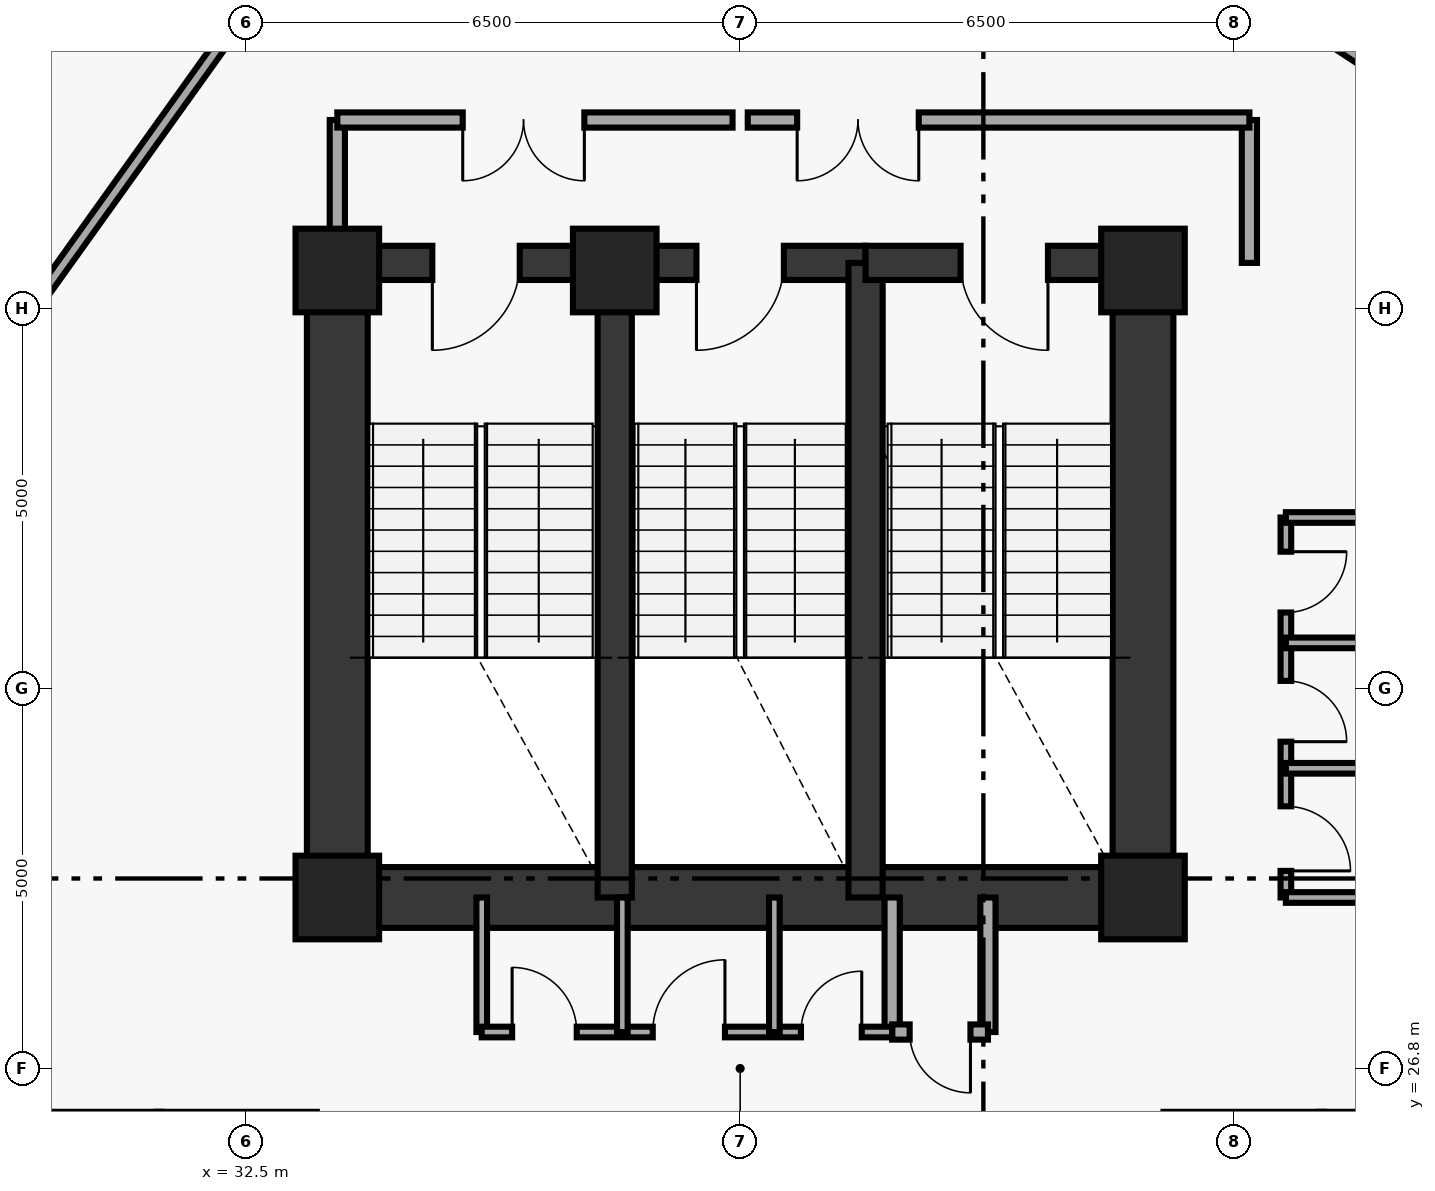
"""IFC4 building model, lengths in metres.
Left out: names, types, materials, properties, quantities, classifications, styles, units other than length and angle.
Written with IfcOpenShell. Run it as: python <this file> out.ifc"""

import sys

from ifc_helpers import new_model, si_unit, direction, frame, frame_2d, origin, origin_2d, place, context, subcontext, project, spatial, rectangle, extrude, element, fill, save


model = new_model("IFC4")
c1 = context("Model", 3, precision=1e-05, world=origin(), true_north=direction((0.0, 1.0)))
c2 = subcontext(c1, "Body", "Model", "MODEL_VIEW")
j1 = project(units=[si_unit("LENGTHUNIT", "METRE"), si_unit("PLANEANGLEUNIT", "RADIAN")], contexts=[c1])
p1 = place(None, origin())
s1 = spatial("IfcSite", under=j1, at=p1, CompositionType="ELEMENT")
p2 = place(p1, origin())
s2 = spatial("IfcBuilding", under=s1, at=p2, CompositionType="ELEMENT")
p3 = place(p2, frame((0.0, 0.0, 21.0)))
s3 = spatial("IfcBuildingStorey", under=s2, at=p3, CompositionType="ELEMENT", Elevation=21.0)
for number, where, z_axis, x_axis in (
    (1, (44.3, 29.05, 0.0), (0.0, 0.0, 1.0), (1.0, 0.0, 0.0)),
    (2, (44.3, 37.3, 0.0), (0.0, 0.0, 1.0), (1.0, 0.0, 0.0)),
    (3, (37.35, 37.3, 0.0), (0.0, 0.0, 1.0), (1.0, 0.0, 0.0)),
    (4, (33.7, 37.3, 0.0), (0.0, 0.0, 1.0), (1.0, 0.0, 0.0)),
    (5, (33.7, 29.05, 0.0), (0.0, 0.0, 1.0), (1.0, 0.0, 0.0)),
):
    element("IfcColumn", number, at=place(p3, frame(where, z_axis=z_axis, x_axis=x_axis)), inside=s3, PredefinedType="PILASTER", context=c2, shape_type="SweptSolid", body=[
        extrude(rectangle(XDim=1.1, YDim=1.1, at=origin_2d()), origin(), (0.0, 0.0, 1.0), 3.79),
    ])
for number, where, z_axis, x_axis in (
    (6, (33.7, 29.05, 0.0), (0.0, 0.0, 1.0), (0.0, 1.0, 0.0)),
    (7, (44.3, 29.05, 0.0), (0.0, 0.0, 1.0), (0.0, 1.0, 0.0)),
):
    element("IfcWall", number, at=place(p3, frame(where, z_axis=z_axis, x_axis=x_axis)), inside=s3, PredefinedType="SHEAR", context=c2, shape_type="SweptSolid", body=[
        extrude(rectangle(XDim=8.35, YDim=0.8, at=frame_2d((4.175, 0.0))), origin(), (0.0, 0.0, 1.0), 3.79),
    ])
p4 = place(p3, frame((33.7, 29.05, 0.0), z_axis=(0.0, 0.0, 1.0), x_axis=(1.0, 0.0, 0.0)))
e8 = element("IfcWall", 8, at=p4, inside=s3, PredefinedType="SHEAR", context=c2, shape_type="SweptSolid", body=[
    extrude(rectangle(XDim=10.6, YDim=0.8, at=frame_2d((5.3, 0.0))), origin(), (0.0, 0.0, 1.0), 3.79),
])
p5 = place(p3, frame((37.35, 37.4, 0.0), z_axis=(0.0, 0.0, 1.0), x_axis=(-1.0, 0.0, 0.0)))
e9 = element("IfcWall", 9, at=p5, inside=s3, PredefinedType="SHEAR", context=c2, shape_type="SweptSolid", body=[
    extrude(rectangle(XDim=3.65, YDim=0.45, at=frame_2d((1.825, 0.0))), origin(), (0.0, 0.0, 1.0), 3.79),
])
p6 = place(p5, frame((1.25, 0.0, 0.0)))
e10 = element("IfcOpeningElement", 10, at=p6, cuts=e9, PredefinedType="OPENING", context=c2, shape_type="SweptSolid", body=[
    extrude(rectangle(XDim=1.15, YDim=2.15, at=frame_2d((0.575, 1.075))), frame((0.0, 0.235, 0.0), z_axis=(0.0, -1.0, 0.0), x_axis=(1.0, 0.0, 0.0)), (0.0, 0.0, 1.0), 0.47),
])
p7 = place(p3, frame((37.35, 29.05, 0.0), z_axis=(0.0, 0.0, 1.0), x_axis=(0.0, 1.0, 0.0)))
e11 = element("IfcWall", 11, at=p7, inside=s3, PredefinedType="SHEAR", context=c2, shape_type="SweptSolid", body=[
    extrude(rectangle(XDim=8.35, YDim=0.45, at=frame_2d((4.175, 0.0))), origin(), (0.0, 0.0, 1.0), 3.79),
])
p8 = place(p3, frame((40.65, 37.4, 0.0), z_axis=(0.0, 0.0, 1.0), x_axis=(-1.0, 0.0, 0.0)))
e12 = element("IfcWall", 12, at=p8, inside=s3, PredefinedType="SHEAR", context=c2, shape_type="SweptSolid", body=[
    extrude(rectangle(XDim=3.3, YDim=0.45, at=frame_2d((1.65, 0.0))), origin(), (0.0, 0.0, 1.0), 3.79),
])
p9 = place(p8, frame((1.075, 0.0, 0.0)))
e13 = element("IfcOpeningElement", 13, at=p9, cuts=e12, PredefinedType="OPENING", context=c2, shape_type="SweptSolid", body=[
    extrude(rectangle(XDim=1.15, YDim=2.15, at=frame_2d((0.575, 1.075))), frame((0.0, 0.235, 0.0), z_axis=(0.0, -1.0, 0.0), x_axis=(1.0, 0.0, 0.0)), (0.0, 0.0, 1.0), 0.47),
])
p10 = place(p3, frame((40.65, 29.05, 0.0), z_axis=(0.0, 0.0, 1.0), x_axis=(0.0, 1.0, 0.0)))
e14 = element("IfcWall", 14, at=p10, inside=s3, PredefinedType="SHEAR", context=c2, shape_type="SweptSolid", body=[
    extrude(rectangle(XDim=8.35, YDim=0.45, at=frame_2d((4.175, 0.0))), origin(), (0.0, 0.0, 1.0), 3.79),
])
p11 = place(p3, frame((44.3, 37.4, 0.0), z_axis=(0.0, 0.0, 1.0), x_axis=(-1.0, 0.0, 0.0)))
e15 = element("IfcWall", 15, at=p11, inside=s3, PredefinedType="SHEAR", context=c2, shape_type="SweptSolid", body=[
    extrude(rectangle(XDim=3.65, YDim=0.45, at=frame_2d((1.825, 0.0))), origin(), (0.0, 0.0, 1.0), 3.79),
])
p12 = place(p11, frame((1.25, 0.0, 0.0)))
e16 = element("IfcOpeningElement", 16, at=p12, cuts=e15, PredefinedType="OPENING", context=c2, shape_type="SweptSolid", body=[
    extrude(rectangle(XDim=1.15, YDim=2.15, at=frame_2d((0.575, 1.075))), frame((0.0, 0.235, 0.0), z_axis=(0.0, -1.0, 0.0), x_axis=(1.0, 0.0, 0.0)), (0.0, 0.0, 1.0), 0.47),
])
for number, where, z_axis, x_axis in (
    (17, (33.7, 37.4, 0.0), (0.0, 0.0, 1.0), (0.0, 1.0, 0.0)),
    (18, (45.7, 37.4, 0.0), (0.0, 0.0, 1.0), (0.0, 1.0, 0.0)),
):
    element("IfcWall", number, at=place(p3, frame(where, z_axis=z_axis, x_axis=x_axis)), inside=s3, PredefinedType="SOLIDWALL", context=c2, shape_type="SweptSolid", body=[
        extrude(rectangle(XDim=1.88, YDim=0.2, at=frame_2d((0.94, 0.0))), origin(), (0.0, 0.0, 1.0), 3.79),
    ])
p13 = place(p3, frame((38.9, 39.28, 0.0), z_axis=(0.0, 0.0, 1.0), x_axis=(-1.0, 0.0, 0.0)))
e19 = element("IfcWall", 19, at=p13, inside=s3, PredefinedType="SOLIDWALL", context=c2, shape_type="SweptSolid", body=[
    extrude(rectangle(XDim=5.2, YDim=0.2, at=frame_2d((2.6, 0.0))), origin(), (0.0, 0.0, 1.0), 3.79),
])
p14 = place(p13, frame((1.95, 0.0, 0.0)))
e20 = element("IfcOpeningElement", 20, at=p14, cuts=e19, PredefinedType="OPENING", context=c2, shape_type="SweptSolid", body=[
    extrude(rectangle(XDim=1.6, YDim=2.2, at=frame_2d((0.8, 1.1))), frame((0.0, 0.11, 0.0), z_axis=(0.0, -1.0, 0.0), x_axis=(1.0, 0.0, 0.0)), (0.0, 0.0, 1.0), 0.22),
])
p15 = place(p3, frame((45.7, 39.28, 0.0), z_axis=(0.0, 0.0, 1.0), x_axis=(-1.0, 0.0, 0.0)))
e21 = element("IfcWall", 21, at=p15, inside=s3, PredefinedType="SOLIDWALL", context=c2, shape_type="SweptSolid", body=[
    extrude(rectangle(XDim=6.6, YDim=0.2, at=frame_2d((3.3, 0.0))), origin(), (0.0, 0.0, 1.0), 3.79),
])
p16 = place(p15, frame((4.35, 0.0, 0.0)))
e22 = element("IfcOpeningElement", 22, at=p16, cuts=e21, PredefinedType="OPENING", context=c2, shape_type="SweptSolid", body=[
    extrude(rectangle(XDim=1.6, YDim=2.2, at=frame_2d((0.8, 1.1))), frame((0.0, 0.11, 0.0), z_axis=(0.0, -1.0, 0.0), x_axis=(1.0, 0.0, 0.0)), (0.0, 0.0, 1.0), 0.22),
])
p17 = place(p3, frame((35.6, 27.28, 0.0), z_axis=(0.0, 0.0, 1.0), x_axis=(0.0, 1.0, 0.0)))
e23 = element("IfcWall", 23, at=p17, inside=s3, PredefinedType="PARTITIONING", context=c2, shape_type="SweptSolid", body=[
    extrude(rectangle(XDim=1.77, YDim=0.14, at=frame_2d((0.885, 0.0))), origin(), (0.0, 0.0, 1.0), 3.79),
])
for number, where, z_axis, x_axis in (
    (24, (41.0, 27.28, 0.0), (0.0, 0.0, 1.0), (0.0, 1.0, 0.0)),
    (25, (42.26, 27.28, 0.0), (0.0, 0.0, 1.0), (0.0, 1.0, 0.0)),
):
    element("IfcWall", number, at=place(p3, frame(where, z_axis=z_axis, x_axis=x_axis)), inside=s3, PredefinedType="SOLIDWALL", context=c2, shape_type="SweptSolid", body=[
        extrude(rectangle(XDim=1.77, YDim=0.2, at=frame_2d((0.885, 0.0))), origin(), (0.0, 0.0, 1.0), 3.79),
    ])
p18 = place(p3, frame((41.0, 27.28, 0.0), z_axis=(0.0, 0.0, 1.0), x_axis=(1.0, 0.0, 0.0)))
e26 = element("IfcWall", 26, at=p18, inside=s3, PredefinedType="SOLIDWALL", context=c2, shape_type="SweptSolid", body=[
    extrude(rectangle(XDim=1.26, YDim=0.2, at=frame_2d((0.63, 0.0))), origin(), (0.0, 0.0, 1.0), 3.79),
])
p19 = place(p18, frame((0.23, 0.0, 0.0)))
e27 = element("IfcOpeningElement", 27, at=p19, cuts=e26, PredefinedType="OPENING", context=c2, shape_type="SweptSolid", body=[
    extrude(rectangle(XDim=0.8, YDim=2.05, at=frame_2d((0.4, 1.025))), frame((0.0, 0.11, 0.0), z_axis=(0.0, -1.0, 0.0), x_axis=(1.0, 0.0, 0.0)), (0.0, 0.0, 1.0), 0.22),
])
p20 = place(p3, frame((35.6, 27.28, 0.0), z_axis=(0.0, 0.0, 1.0), x_axis=(1.0, 0.0, 0.0)))
e28 = element("IfcWall", 28, at=p20, inside=s3, PredefinedType="PARTITIONING", context=c2, shape_type="SweptSolid", body=[
    extrude(rectangle(XDim=5.4, YDim=0.14, at=frame_2d((2.7, 0.0))), origin(), (0.0, 0.0, 1.0), 3.79),
])
p21 = place(p20, frame((0.4, 0.0, 0.0)))
e29 = element("IfcOpeningElement", 29, at=p21, cuts=e28, PredefinedType="OPENING", context=c2, shape_type="SweptSolid", body=[
    extrude(rectangle(XDim=0.85, YDim=2.1, at=frame_2d((0.425, 1.05))), frame((0.0, 0.08, 0.0), z_axis=(0.0, -1.0, 0.0), x_axis=(1.0, 0.0, 0.0)), (0.0, 0.0, 1.0), 0.16),
])
p22 = place(p20, frame((2.25, 0.0, 0.0)))
e30 = element("IfcOpeningElement", 30, at=p22, cuts=e28, PredefinedType="OPENING", context=c2, shape_type="SweptSolid", body=[
    extrude(rectangle(XDim=0.95, YDim=2.1, at=frame_2d((0.475, 1.05))), frame((0.0, 0.08, 0.0), z_axis=(0.0, -1.0, 0.0), x_axis=(1.0, 0.0, 0.0)), (0.0, 0.0, 1.0), 0.16),
])
p23 = place(p20, frame((4.2, 0.0, 0.0)))
e31 = element("IfcOpeningElement", 31, at=p23, cuts=e28, PredefinedType="OPENING", context=c2, shape_type="SweptSolid", body=[
    extrude(rectangle(XDim=0.8, YDim=2.05, at=frame_2d((0.4, 1.025))), frame((0.0, 0.08, 0.0), z_axis=(0.0, -1.0, 0.0), x_axis=(1.0, 0.0, 0.0)), (0.0, 0.0, 1.0), 0.16),
])
for number, where, z_axis, x_axis in (
    (32, (37.45, 27.28, 0.0), (0.0, 0.0, 1.0), (0.0, 1.0, 0.0)),
    (33, (39.45, 27.28, 0.0), (0.0, 0.0, 1.0), (0.0, 1.0, 0.0)),
):
    element("IfcWall", number, at=place(p3, frame(where, z_axis=z_axis, x_axis=x_axis)), inside=s3, PredefinedType="PARTITIONING", context=c2, shape_type="SweptSolid", body=[
        extrude(rectangle(XDim=1.77, YDim=0.14, at=frame_2d((0.885, 0.0))), origin(), (0.0, 0.0, 1.0), 3.79),
    ])
p24 = place(p3, frame((46.18, 34.05, 0.0), z_axis=(0.0, 0.0, 1.0), x_axis=(0.0, -1.0, 0.0)))
e34 = element("IfcWall", 34, at=p24, inside=s3, PredefinedType="PARTITIONING", context=c2, shape_type="SweptSolid", body=[
    extrude(rectangle(XDim=5.0, YDim=0.14, at=frame_2d((2.5, 0.0))), origin(), (0.0, 0.0, 1.0), 3.79),
])
p25 = place(p24, frame((3.8, 0.0, 0.0)))
e35 = element("IfcOpeningElement", 35, at=p25, cuts=e34, PredefinedType="OPENING", context=c2, shape_type="SweptSolid", body=[
    extrude(rectangle(XDim=0.85, YDim=2.1, at=frame_2d((0.425, 1.05))), frame((0.0, 0.08, 0.0), z_axis=(0.0, -1.0, 0.0), x_axis=(1.0, 0.0, 0.0)), (0.0, 0.0, 1.0), 0.16),
])
p26 = place(p24, frame((2.15, 0.0, 0.0)))
e36 = element("IfcOpeningElement", 36, at=p26, cuts=e34, PredefinedType="OPENING", context=c2, shape_type="SweptSolid", body=[
    extrude(rectangle(XDim=0.8, YDim=2.05, at=frame_2d((0.4, 1.025))), frame((0.0, 0.08, 0.0), z_axis=(0.0, -1.0, 0.0), x_axis=(1.0, 0.0, 0.0)), (0.0, 0.0, 1.0), 0.16),
])
p27 = place(p24, frame((0.45, 0.0, 0.0)))
e37 = element("IfcOpeningElement", 37, at=p27, cuts=e34, PredefinedType="OPENING", context=c2, shape_type="SweptSolid", body=[
    extrude(rectangle(XDim=0.8, YDim=2.05, at=frame_2d((0.4, 1.025))), frame((0.0, 0.08, 0.0), z_axis=(0.0, -1.0, 0.0), x_axis=(1.0, 0.0, 0.0)), (0.0, 0.0, 1.0), 0.16),
])
for number, where, z_axis, x_axis in (
    (38, (46.18, 29.05, 0.0), (0.0, 0.0, 1.0), (1.0, 0.0, 0.0)),
    (39, (46.18, 30.75, 0.0), (0.0, 0.0, 1.0), (1.0, 0.0, 0.0)),
    (40, (46.18, 32.4, 0.0), (0.0, 0.0, 1.0), (1.0, 0.0, 0.0)),
    (41, (46.18, 34.05, 0.0), (0.0, 0.0, 1.0), (1.0, 0.0, 0.0)),
):
    element("IfcWall", number, at=place(p3, frame(where, z_axis=z_axis, x_axis=x_axis)), inside=s3, PredefinedType="PARTITIONING", context=c2, shape_type="SweptSolid", body=[
        extrude(rectangle(XDim=1.64, YDim=0.14, at=frame_2d((0.82, 0.0))), origin(), (0.0, 0.0, 1.0), 3.79),
    ])
p28 = place(p3, frame((49.201, 38.752, 0.0), z_axis=(0.0, 0.0, 1.0), x_axis=(-0.835989779889, 0.548745011751, 0.0)))
e42 = element("IfcWall", 42, at=p28, inside=s3, PredefinedType="PARTITIONING", context=c2, shape_type="SweptSolid", body=[
    extrude(rectangle(XDim=7.767, YDim=0.16, at=frame_2d((3.883, 0.0))), origin(), (0.0, 0.0, 1.0), 3.79),
])
p29 = place(p3, frame((32.281, 40.436, 0.0), z_axis=(0.0, 0.0, 1.0), x_axis=(-0.581884927471, -0.813271130179, 0.0)))
e43 = element("IfcWall", 43, at=p29, inside=s3, PredefinedType="PARTITIONING", context=c2, shape_type="SweptSolid", body=[
    extrude(rectangle(XDim=7.532, YDim=0.16, at=frame_2d((3.766, 0.0))), origin(), (0.0, 0.0, 1.0), 3.79),
])
p30 = place(p6, origin())
e44 = element("IfcDoor", 44, at=p30, inside=s3, OperationType="SINGLE_SWING_RIGHT", PredefinedType="DOOR", context=c2, shape_type="SweptSolid", body=[
    extrude(rectangle(XDim=1.15, YDim=2.15, at=frame_2d((0.575, 1.075))), frame((0.0, 0.025, 0.0), z_axis=(0.0, -1.0, 0.0), x_axis=(1.0, 0.0, 0.0)), (0.0, 0.0, 1.0), 0.05),
])
fill(e10, e44)
p31 = place(p9, origin())
e45 = element("IfcDoor", 45, at=p31, inside=s3, OperationType="SINGLE_SWING_RIGHT", PredefinedType="DOOR", context=c2, shape_type="SweptSolid", body=[
    extrude(rectangle(XDim=1.15, YDim=2.15, at=frame_2d((0.575, 1.075))), frame((0.0, 0.025, 0.0), z_axis=(0.0, -1.0, 0.0), x_axis=(1.0, 0.0, 0.0)), (0.0, 0.0, 1.0), 0.05),
])
fill(e13, e45)
p32 = place(p12, origin())
e46 = element("IfcDoor", 46, at=p32, inside=s3, OperationType="SINGLE_SWING_LEFT", PredefinedType="DOOR", context=c2, shape_type="SweptSolid", body=[
    extrude(rectangle(XDim=1.15, YDim=2.15, at=frame_2d((0.575, 1.075))), frame((0.0, 0.025, 0.0), z_axis=(0.0, -1.0, 0.0), x_axis=(1.0, 0.0, 0.0)), (0.0, 0.0, 1.0), 0.05),
])
fill(e16, e46)
p33 = place(p14, origin())
e47 = element("IfcDoor", 47, at=p33, inside=s3, OperationType="DOUBLE_DOOR_SINGLE_SWING", PredefinedType="DOOR", context=c2, shape_type="SweptSolid", body=[
    extrude(rectangle(XDim=1.6, YDim=2.2, at=frame_2d((0.8, 1.1))), frame((0.0, 0.025, 0.0), z_axis=(0.0, -1.0, 0.0), x_axis=(1.0, 0.0, 0.0)), (0.0, 0.0, 1.0), 0.05),
])
fill(e20, e47)
p34 = place(p16, origin())
e48 = element("IfcDoor", 48, at=p34, inside=s3, OperationType="DOUBLE_DOOR_SINGLE_SWING", PredefinedType="DOOR", context=c2, shape_type="SweptSolid", body=[
    extrude(rectangle(XDim=1.6, YDim=2.2, at=frame_2d((0.8, 1.1))), frame((0.0, 0.025, 0.0), z_axis=(0.0, -1.0, 0.0), x_axis=(1.0, 0.0, 0.0)), (0.0, 0.0, 1.0), 0.05),
])
fill(e22, e48)
p35 = place(p19, origin())
e49 = element("IfcDoor", 49, at=p35, inside=s3, OperationType="SINGLE_SWING_RIGHT", PredefinedType="DOOR", context=c2, shape_type="SweptSolid", body=[
    extrude(rectangle(XDim=0.8, YDim=2.05, at=frame_2d((0.4, 1.025))), frame((0.0, 0.025, 0.0), z_axis=(0.0, -1.0, 0.0), x_axis=(1.0, 0.0, 0.0)), (0.0, 0.0, 1.0), 0.05),
])
fill(e27, e49)
p36 = place(p21, origin())
e50 = element("IfcDoor", 50, at=p36, inside=s3, OperationType="SINGLE_SWING_LEFT", PredefinedType="DOOR", context=c2, shape_type="SweptSolid", body=[
    extrude(rectangle(XDim=0.85, YDim=2.1, at=frame_2d((0.425, 1.05))), frame((0.0, 0.025, 0.0), z_axis=(0.0, -1.0, 0.0), x_axis=(1.0, 0.0, 0.0)), (0.0, 0.0, 1.0), 0.05),
])
fill(e29, e50)
p37 = place(p22, origin())
e51 = element("IfcDoor", 51, at=p37, inside=s3, OperationType="SINGLE_SWING_RIGHT", PredefinedType="DOOR", context=c2, shape_type="SweptSolid", body=[
    extrude(rectangle(XDim=0.95, YDim=2.1, at=frame_2d((0.475, 1.05))), frame((0.0, 0.025, 0.0), z_axis=(0.0, -1.0, 0.0), x_axis=(1.0, 0.0, 0.0)), (0.0, 0.0, 1.0), 0.05),
])
fill(e30, e51)
p38 = place(p23, origin())
e52 = element("IfcDoor", 52, at=p38, inside=s3, OperationType="SINGLE_SWING_RIGHT", PredefinedType="DOOR", context=c2, shape_type="SweptSolid", body=[
    extrude(rectangle(XDim=0.8, YDim=2.05, at=frame_2d((0.4, 1.025))), frame((0.0, 0.025, 0.0), z_axis=(0.0, -1.0, 0.0), x_axis=(1.0, 0.0, 0.0)), (0.0, 0.0, 1.0), 0.05),
])
fill(e31, e52)
p39 = place(p25, origin())
e53 = element("IfcDoor", 53, at=p39, inside=s3, OperationType="SINGLE_SWING_RIGHT", PredefinedType="DOOR", context=c2, shape_type="SweptSolid", body=[
    extrude(rectangle(XDim=0.85, YDim=2.1, at=frame_2d((0.425, 1.05))), frame((0.0, 0.025, 0.0), z_axis=(0.0, -1.0, 0.0), x_axis=(1.0, 0.0, 0.0)), (0.0, 0.0, 1.0), 0.05),
])
fill(e35, e53)
p40 = place(p26, origin())
e54 = element("IfcDoor", 54, at=p40, inside=s3, OperationType="SINGLE_SWING_RIGHT", PredefinedType="DOOR", context=c2, shape_type="SweptSolid", body=[
    extrude(rectangle(XDim=0.8, YDim=2.05, at=frame_2d((0.4, 1.025))), frame((0.0, 0.025, 0.0), z_axis=(0.0, -1.0, 0.0), x_axis=(1.0, 0.0, 0.0)), (0.0, 0.0, 1.0), 0.05),
])
fill(e36, e54)
p41 = place(p27, origin())
e55 = element("IfcDoor", 55, at=p41, inside=s3, OperationType="SINGLE_SWING_LEFT", PredefinedType="DOOR", context=c2, shape_type="SweptSolid", body=[
    extrude(rectangle(XDim=0.8, YDim=2.05, at=frame_2d((0.4, 1.025))), frame((0.0, 0.025, 0.0), z_axis=(0.0, -1.0, 0.0), x_axis=(1.0, 0.0, 0.0)), (0.0, 0.0, 1.0), 0.05),
])
fill(e37, e55)
save(model, sys.argv[1])
